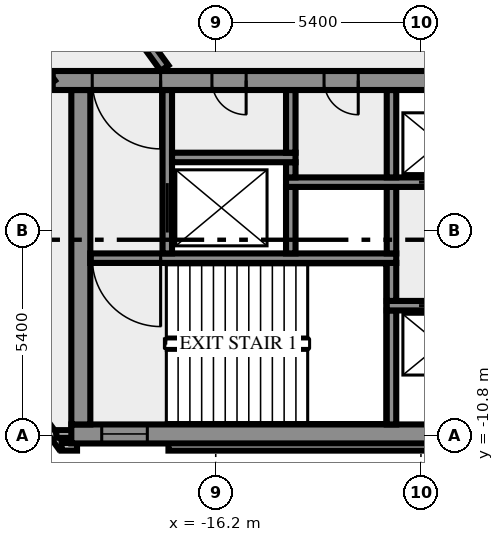
"""IFC4 building model, lengths in metres.
Left out: names, types, materials, properties, quantities, classifications, styles, units other than length and angle.
Written with IfcOpenShell. Run it as: python <this file> out.ifc"""

import sys

from ifc_helpers import new_model, si_unit, direction, frame, frame_2d, origin, place, context, subcontext, project, spatial, rectangle, extrude, element, fill, save


model = new_model("IFC4")
c1 = context("Model", 3, precision=1e-05, world=origin(), true_north=direction((0.0, 1.0)))
c2 = subcontext(c1, "Body", "Model", "MODEL_VIEW")
j1 = project(units=[si_unit("LENGTHUNIT", "METRE"), si_unit("PLANEANGLEUNIT", "RADIAN")], contexts=[c1])
p1 = place(None, origin())
s1 = spatial("IfcSite", under=j1, at=p1, CompositionType="ELEMENT")
p2 = place(p1, origin())
s2 = spatial("IfcBuilding", under=s1, at=p2, CompositionType="ELEMENT")
p3 = place(p2, frame((0.0, 0.0, 93.0)))
s3 = spatial("IfcBuildingStorey", under=s2, at=p3, CompositionType="ELEMENT", Elevation=93.0)
p4 = place(p3, frame((-21.833, -8.909, 0.0), z_axis=(0.0, 0.0, 1.0), x_axis=(0.587766567315, -0.809030569476, 0.0)))
e1 = element("IfcWall", 1, at=p4, inside=s3, PredefinedType="SOLIDWALL", context=c2, shape_type="SweptSolid", body=[
    extrude(rectangle(XDim=2.688, YDim=0.2, at=frame_2d((1.344, 0.0))), origin(), (0.0, 0.0, 1.0), 3.65),
])
p5 = place(p3, frame((-20.256, -11.088, 0.0), z_axis=(0.0, 0.0, 1.0), x_axis=(1.0, 0.0, 0.0)))
e2 = element("IfcWall", 2, at=p5, inside=s3, PredefinedType="SOLIDWALL", context=c2, shape_type="SweptSolid", body=[
    extrude(rectangle(XDim=0.406, YDim=0.2, at=frame_2d((0.203, 0.0))), origin(), (0.0, 0.0, 1.0), 3.65),
])
p6 = place(p3, frame((-17.444, -11.088, 0.0), z_axis=(0.0, 0.0, 1.0), x_axis=(1.0, 0.0, 0.0)))
e3 = element("IfcWall", 3, at=p6, inside=s3, PredefinedType="SOLIDWALL", context=c2, shape_type="SweptSolid", body=[
    extrude(rectangle(XDim=34.888, YDim=0.2, at=frame_2d((17.444, 0.0))), origin(), (0.0, 0.0, 1.0), 3.65),
])
p7 = place(p3, frame((-19.98, -10.75, 0.0), z_axis=(0.0, 0.0, 1.0), x_axis=(-1.0, 0.0, 0.0)))
e4 = element("IfcWall", 4, at=p7, inside=s3, PredefinedType="SOLIDWALL", context=c2, shape_type="SweptSolid", body=[
    extrude(rectangle(XDim=0.417, YDim=0.2, at=frame_2d((0.208, 0.0))), origin(), (0.0, 0.0, 1.0), 3.65),
])
p8 = place(p3, frame((-20.0, -10.75, 0.0), z_axis=(0.0, 0.0, 1.0), x_axis=(1.0, 0.0, 0.0)))
e5 = element("IfcWall", 5, at=p8, inside=s3, PredefinedType="SHEAR", context=c2, shape_type="SweptSolid", body=[
    extrude(rectangle(XDim=40.0, YDim=0.5, at=frame_2d((20.0, 0.0))), origin(), (0.0, 0.0, 1.0), 3.65),
])
p9 = place(p8, frame((0.8, 0.0, 1.0)))
e6 = element("IfcOpeningElement", 6, at=p9, cuts=e5, PredefinedType="OPENING", context=c2, shape_type="SweptSolid", body=[
    extrude(rectangle(XDim=1.2, YDim=1.2, at=frame_2d((0.6, 0.6))), frame((0.0, 0.26, 0.0), z_axis=(0.0, -1.0, 0.0), x_axis=(1.0, 0.0, 0.0)), (0.0, 0.0, 1.0), 0.52),
])
p10 = place(p8, frame((38.0, 0.0, 1.0)))
e7 = element("IfcOpeningElement", 7, at=p10, cuts=e5, PredefinedType="OPENING", context=c2, shape_type="SweptSolid", body=[
    extrude(rectangle(XDim=1.2, YDim=1.2, at=frame_2d((0.6, 0.6))), frame((0.0, 0.26, 0.0), z_axis=(0.0, -1.0, 0.0), x_axis=(1.0, 0.0, 0.0)), (0.0, 0.0, 1.0), 0.52),
])
p11 = place(p3, frame((-19.75, -10.5, 0.0), z_axis=(0.0, 0.0, 1.0), x_axis=(0.0, 1.0, 0.0)))
e8 = element("IfcWall", 8, at=p11, inside=s3, PredefinedType="SHEAR", context=c2, shape_type="SweptSolid", body=[
    extrude(rectangle(XDim=8.8, YDim=0.5, at=frame_2d((4.4, 0.0))), origin(), (0.0, 0.0, 1.0), 3.65),
])
p12 = place(p3, frame((-11.575, -10.5, 0.0), z_axis=(0.0, 0.0, 1.0), x_axis=(0.0, 1.0, 0.0)))
e9 = element("IfcWall", 9, at=p12, inside=s3, PredefinedType="SHEAR", context=c2, shape_type="SweptSolid", body=[
    extrude(rectangle(XDim=3.0, YDim=0.25, at=frame_2d((1.5, 0.0))), origin(), (0.0, 0.0, 1.0), 3.65),
])
p13 = place(p3, frame((11.7, -7.375, 0.0), z_axis=(0.0, 0.0, 1.0), x_axis=(-1.0, 0.0, 0.0)))
e10 = element("IfcWall", 10, at=p13, inside=s3, PredefinedType="SHEAR", context=c2, shape_type="SweptSolid", body=[
    extrude(rectangle(XDim=23.4, YDim=0.25, at=frame_2d((11.7, 0.0))), origin(), (0.0, 0.0, 1.0), 3.65),
])
p14 = place(p13, frame((21.45, 0.0, 0.0)))
e11 = element("IfcOpeningElement", 11, at=p14, cuts=e10, PredefinedType="OPENING", context=c2, shape_type="SweptSolid", body=[
    extrude(rectangle(XDim=1.1, YDim=2.1, at=frame_2d((0.55, 1.05))), frame((0.0, 0.135, 0.0), z_axis=(0.0, -1.0, 0.0), x_axis=(1.0, 0.0, 0.0)), (0.0, 0.0, 1.0), 0.27),
])
p15 = place(p13, frame((18.95, 0.0, 0.0)))
e12 = element("IfcOpeningElement", 12, at=p15, cuts=e10, PredefinedType="OPENING", context=c2, shape_type="SweptSolid", body=[
    extrude(rectangle(XDim=1.1, YDim=2.1, at=frame_2d((0.55, 1.05))), frame((0.0, 0.135, 0.0), z_axis=(0.0, -1.0, 0.0), x_axis=(1.0, 0.0, 0.0)), (0.0, 0.0, 1.0), 0.27),
])
p16 = place(p13, frame((16.45, 0.0, 0.0)))
e13 = element("IfcOpeningElement", 13, at=p16, cuts=e10, PredefinedType="OPENING", context=c2, shape_type="SweptSolid", body=[
    extrude(rectangle(XDim=1.1, YDim=2.1, at=frame_2d((0.55, 1.05))), frame((0.0, 0.135, 0.0), z_axis=(0.0, -1.0, 0.0), x_axis=(1.0, 0.0, 0.0)), (0.0, 0.0, 1.0), 0.27),
])
p17 = place(p13, frame((14.25, 0.0, 0.0)))
e14 = element("IfcOpeningElement", 14, at=p17, cuts=e10, PredefinedType="OPENING", context=c2, shape_type="SweptSolid", body=[
    extrude(rectangle(XDim=0.9, YDim=2.1, at=frame_2d((0.45, 1.05))), frame((0.0, 0.135, 0.0), z_axis=(0.0, -1.0, 0.0), x_axis=(1.0, 0.0, 0.0)), (0.0, 0.0, 1.0), 0.27),
])
p18 = place(p13, frame((12.125, 0.0, 0.0)))
e15 = element("IfcOpeningElement", 15, at=p18, cuts=e10, PredefinedType="OPENING", context=c2, shape_type="SweptSolid", body=[
    extrude(rectangle(XDim=0.9, YDim=2.1, at=frame_2d((0.45, 1.05))), frame((0.0, 0.135, 0.0), z_axis=(0.0, -1.0, 0.0), x_axis=(1.0, 0.0, 0.0)), (0.0, 0.0, 1.0), 0.27),
])
p19 = place(p13, frame((10.45, 0.0, 0.0)))
e16 = element("IfcOpeningElement", 16, at=p19, cuts=e10, PredefinedType="OPENING", context=c2, shape_type="SweptSolid", body=[
    extrude(rectangle(XDim=0.75, YDim=2.1, at=frame_2d((0.375, 1.05))), frame((0.0, 0.135, 0.0), z_axis=(0.0, -1.0, 0.0), x_axis=(1.0, 0.0, 0.0)), (0.0, 0.0, 1.0), 0.27),
])
p20 = place(p3, frame((-11.575, -7.25, 0.0), z_axis=(0.0, 0.0, 1.0), x_axis=(0.0, 1.0, 0.0)))
e17 = element("IfcWall", 17, at=p20, inside=s3, PredefinedType="SHEAR", context=c2, shape_type="SweptSolid", body=[
    extrude(rectangle(XDim=1.0, YDim=0.25, at=frame_2d((0.5, 0.0))), origin(), (0.0, 0.0, 1.0), 3.65),
])
p21 = place(p3, frame((-11.45, -6.125, 0.0), z_axis=(0.0, 0.0, 1.0), x_axis=(-1.0, 0.0, 0.0)))
e18 = element("IfcWall", 18, at=p21, inside=s3, PredefinedType="SHEAR", context=c2, shape_type="SweptSolid", body=[
    extrude(rectangle(XDim=8.05, YDim=0.25, at=frame_2d((4.025, 0.0))), origin(), (0.0, 0.0, 1.0), 3.65),
])
p22 = place(p21, frame((6.2, 0.0, 0.0)))
e19 = element("IfcOpeningElement", 19, at=p22, cuts=e18, PredefinedType="OPENING", context=c2, shape_type="SweptSolid", body=[
    extrude(rectangle(XDim=1.8, YDim=2.1, at=frame_2d((0.9, 1.05))), frame((0.0, 0.135, 0.0), z_axis=(0.0, -1.0, 0.0), x_axis=(1.0, 0.0, 0.0)), (0.0, 0.0, 1.0), 0.27),
])
p23 = place(p3, frame((-17.475, -6.0, 0.0), z_axis=(0.0, 0.0, 1.0), x_axis=(0.0, 1.0, 0.0)))
e20 = element("IfcWall", 20, at=p23, inside=s3, PredefinedType="SHEAR", context=c2, shape_type="SweptSolid", body=[
    extrude(rectangle(XDim=4.3, YDim=0.25, at=frame_2d((2.15, 0.0))), origin(), (0.0, 0.0, 1.0), 3.65),
])
p24 = place(p23, frame((0.55, 0.0, 0.0)))
e21 = element("IfcOpeningElement", 21, at=p24, cuts=e20, PredefinedType="OPENING", context=c2, shape_type="SweptSolid", body=[
    extrude(rectangle(XDim=1.3, YDim=2.1, at=frame_2d((0.65, 1.05))), frame((0.0, 0.135, 0.0), z_axis=(0.0, -1.0, 0.0), x_axis=(1.0, 0.0, 0.0)), (0.0, 0.0, 1.0), 0.27),
])
for number, where, z_axis, x_axis in (
    (22, (-14.225, -6.0, 0.0), (0.0, 0.0, 1.0), (0.0, 1.0, 0.0)),
    (23, (-11.575, -6.0, 0.0), (0.0, 0.0, 1.0), (0.0, 1.0, 0.0)),
):
    element("IfcWall", number, at=place(p3, frame(where, z_axis=z_axis, x_axis=x_axis)), inside=s3, PredefinedType="SHEAR", context=c2, shape_type="SweptSolid", body=[
        extrude(rectangle(XDim=1.75, YDim=0.25, at=frame_2d((0.875, 0.0))), origin(), (0.0, 0.0, 1.0), 3.65),
    ])
p25 = place(p3, frame((-14.35, -4.125, 0.0), z_axis=(0.0, 0.0, 1.0), x_axis=(1.0, 0.0, 0.0)))
e24 = element("IfcWall", 24, at=p25, inside=s3, PredefinedType="SHEAR", context=c2, shape_type="SweptSolid", body=[
    extrude(rectangle(XDim=10.4, YDim=0.25, at=frame_2d((5.2, 0.0))), origin(), (0.0, 0.0, 1.0), 3.65),
])
p26 = place(p25, frame((3.5, 0.0, 0.0)))
e25 = element("IfcOpeningElement", 25, at=p26, cuts=e24, PredefinedType="OPENING", context=c2, shape_type="SweptSolid", body=[
    extrude(rectangle(XDim=1.1, YDim=2.1, at=frame_2d((0.55, 1.05))), frame((0.0, 0.135, 0.0), z_axis=(0.0, -1.0, 0.0), x_axis=(1.0, 0.0, 0.0)), (0.0, 0.0, 1.0), 0.27),
])
p27 = place(p25, frame((6.0, 0.0, 0.0)))
e26 = element("IfcOpeningElement", 26, at=p27, cuts=e24, PredefinedType="OPENING", context=c2, shape_type="SweptSolid", body=[
    extrude(rectangle(XDim=1.1, YDim=2.1, at=frame_2d((0.55, 1.05))), frame((0.0, 0.135, 0.0), z_axis=(0.0, -1.0, 0.0), x_axis=(1.0, 0.0, 0.0)), (0.0, 0.0, 1.0), 0.27),
])
p28 = place(p25, frame((8.5, 0.0, 0.0)))
e27 = element("IfcOpeningElement", 27, at=p28, cuts=e24, PredefinedType="OPENING", context=c2, shape_type="SweptSolid", body=[
    extrude(rectangle(XDim=1.1, YDim=2.1, at=frame_2d((0.55, 1.05))), frame((0.0, 0.135, 0.0), z_axis=(0.0, -1.0, 0.0), x_axis=(1.0, 0.0, 0.0)), (0.0, 0.0, 1.0), 0.27),
])
p29 = place(p3, frame((-14.225, -4.0, 0.0), z_axis=(0.0, 0.0, 1.0), x_axis=(0.0, 1.0, 0.0)))
e28 = element("IfcWall", 28, at=p29, inside=s3, PredefinedType="SHEAR", context=c2, shape_type="SweptSolid", body=[
    extrude(rectangle(XDim=0.4, YDim=0.25, at=frame_2d((0.2, 0.0))), origin(), (0.0, 0.0, 1.0), 3.65),
])
p30 = place(p3, frame((-11.575, -4.0, 0.0), z_axis=(0.0, 0.0, 1.0), x_axis=(0.0, 1.0, 0.0)))
e29 = element("IfcWall", 29, at=p30, inside=s3, PredefinedType="SHEAR", context=c2, shape_type="SweptSolid", body=[
    extrude(rectangle(XDim=2.3, YDim=0.25, at=frame_2d((1.15, 0.0))), origin(), (0.0, 0.0, 1.0), 3.65),
])
p31 = place(p3, frame((-17.35, -3.475, 0.0), z_axis=(0.0, 0.0, 1.0), x_axis=(1.0, 0.0, 0.0)))
e30 = element("IfcWall", 30, at=p31, inside=s3, PredefinedType="SHEAR", context=c2, shape_type="SweptSolid", body=[
    extrude(rectangle(XDim=3.25, YDim=0.25, at=frame_2d((1.625, 0.0))), origin(), (0.0, 0.0, 1.0), 3.65),
])
p32 = place(p3, frame((-14.225, -3.35, 0.0), z_axis=(0.0, 0.0, 1.0), x_axis=(0.0, 1.0, 0.0)))
e31 = element("IfcWall", 31, at=p32, inside=s3, PredefinedType="SHEAR", context=c2, shape_type="SweptSolid", body=[
    extrude(rectangle(XDim=1.65, YDim=0.25, at=frame_2d((0.825, 0.0))), origin(), (0.0, 0.0, 1.0), 3.65),
])
p33 = place(p3, frame((20.49, -1.45, 0.0), z_axis=(0.0, 0.0, 1.0), x_axis=(-1.0, 0.0, 0.0)))
e32 = element("IfcWall", 32, at=p33, inside=s3, PredefinedType="SHEAR", context=c2, shape_type="SweptSolid", body=[
    extrude(rectangle(XDim=40.98, YDim=0.5, at=frame_2d((20.49, 0.0))), origin(), (0.0, 0.0, 1.0), 3.65),
])
p34 = place(p33, frame((38.14, 0.0, 0.0)))
e33 = element("IfcOpeningElement", 33, at=p34, cuts=e32, PredefinedType="OPENING", context=c2, shape_type="SweptSolid", body=[
    extrude(rectangle(XDim=1.8, YDim=2.1, at=frame_2d((0.9, 1.05))), frame((0.0, 0.26, 0.0), z_axis=(0.0, -1.0, 0.0), x_axis=(1.0, 0.0, 0.0)), (0.0, 0.0, 1.0), 0.52),
])
p35 = place(p33, frame((35.89, 0.0, 0.0)))
e34 = element("IfcOpeningElement", 34, at=p35, cuts=e32, PredefinedType="OPENING", context=c2, shape_type="SweptSolid", body=[
    extrude(rectangle(XDim=0.9, YDim=2.1, at=frame_2d((0.45, 1.05))), frame((0.0, 0.26, 0.0), z_axis=(0.0, -1.0, 0.0), x_axis=(1.0, 0.0, 0.0)), (0.0, 0.0, 1.0), 0.52),
])
p36 = place(p33, frame((32.94, 0.0, 0.0)))
e35 = element("IfcOpeningElement", 35, at=p36, cuts=e32, PredefinedType="OPENING", context=c2, shape_type="SweptSolid", body=[
    extrude(rectangle(XDim=0.9, YDim=2.1, at=frame_2d((0.45, 1.05))), frame((0.0, 0.26, 0.0), z_axis=(0.0, -1.0, 0.0), x_axis=(1.0, 0.0, 0.0)), (0.0, 0.0, 1.0), 0.52),
])
p37 = place(p33, frame((21.765, 0.0, 0.0)))
e36 = element("IfcOpeningElement", 36, at=p37, cuts=e32, PredefinedType="OPENING", context=c2, shape_type="SweptSolid", body=[
    extrude(rectangle(XDim=2.0, YDim=2.1, at=frame_2d((1.0, 1.05))), frame((0.0, 0.26, 0.0), z_axis=(0.0, -1.0, 0.0), x_axis=(1.0, 0.0, 0.0)), (0.0, 0.0, 1.0), 0.52),
])
p38 = place(p33, frame((7.14, 0.0, 0.0)))
e37 = element("IfcOpeningElement", 37, at=p38, cuts=e32, PredefinedType="OPENING", context=c2, shape_type="SweptSolid", body=[
    extrude(rectangle(XDim=0.9, YDim=2.1, at=frame_2d((0.45, 1.05))), frame((0.0, 0.26, 0.0), z_axis=(0.0, -1.0, 0.0), x_axis=(1.0, 0.0, 0.0)), (0.0, 0.0, 1.0), 0.52),
])
p39 = place(p33, frame((5.028, 0.0, 0.0)))
e38 = element("IfcOpeningElement", 38, at=p39, cuts=e32, PredefinedType="OPENING", context=c2, shape_type="SweptSolid", body=[
    extrude(rectangle(XDim=0.8, YDim=2.1, at=frame_2d((0.4, 1.05))), frame((0.0, 0.26, 0.0), z_axis=(0.0, -1.0, 0.0), x_axis=(1.0, 0.0, 0.0)), (0.0, 0.0, 1.0), 0.52),
])
p40 = place(p33, frame((3.452, 0.0, 0.0)))
e39 = element("IfcOpeningElement", 39, at=p40, cuts=e32, PredefinedType="OPENING", context=c2, shape_type="SweptSolid", body=[
    extrude(rectangle(XDim=0.8, YDim=2.1, at=frame_2d((0.4, 1.05))), frame((0.0, 0.26, 0.0), z_axis=(0.0, -1.0, 0.0), x_axis=(1.0, 0.0, 0.0)), (0.0, 0.0, 1.0), 0.52),
])
p41 = place(p33, frame((1.04, 0.0, 0.0)))
e40 = element("IfcOpeningElement", 40, at=p41, cuts=e32, PredefinedType="OPENING", context=c2, shape_type="SweptSolid", body=[
    extrude(rectangle(XDim=1.8, YDim=2.1, at=frame_2d((0.9, 1.05))), frame((0.0, 0.26, 0.0), z_axis=(0.0, -1.0, 0.0), x_axis=(1.0, 0.0, 0.0)), (0.0, 0.0, 1.0), 0.52),
])
p42 = place(p3, frame((-20.531, -1.523, 0.0), z_axis=(0.0, 0.0, 1.0), x_axis=(-0.587784522481, 0.809017524614, 0.0)))
e41 = element("IfcWall", 41, at=p42, inside=s3, PredefinedType="SOLIDWALL", context=c2, shape_type="SweptSolid", body=[
    extrude(rectangle(XDim=49.912, YDim=0.25, at=frame_2d((24.956, 0.0))), origin(), (0.0, 0.0, 1.0), 3.65),
])
p43 = place(p42, frame((0.533, 0.0, 0.0)))
e42 = element("IfcOpeningElement", 42, at=p43, cuts=e41, PredefinedType="OPENING", context=c2, shape_type="SweptSolid", body=[
    extrude(rectangle(XDim=0.9, YDim=2.1, at=frame_2d((0.45, 1.05))), frame((0.0, 0.135, 0.0), z_axis=(0.0, -1.0, 0.0), x_axis=(1.0, 0.0, 0.0)), (0.0, 0.0, 1.0), 0.27),
])
p44 = place(p42, frame((48.47, 0.0, 0.0)))
e43 = element("IfcOpeningElement", 43, at=p44, cuts=e41, PredefinedType="OPENING", context=c2, shape_type="SweptSolid", body=[
    extrude(rectangle(XDim=1.0, YDim=2.1, at=frame_2d((0.5, 1.05))), frame((0.0, 0.135, 0.0), z_axis=(0.0, -1.0, 0.0), x_axis=(1.0, 0.0, 0.0)), (0.0, 0.0, 1.0), 0.27),
])
p45 = place(p42, frame((17.365, 0.0, 0.0)))
e44 = element("IfcOpeningElement", 44, at=p45, cuts=e41, PredefinedType="OPENING", context=c2, shape_type="SweptSolid", body=[
    extrude(rectangle(XDim=1.8, YDim=2.1, at=frame_2d((0.9, 1.05))), frame((0.0, 0.135, 0.0), z_axis=(0.0, -1.0, 0.0), x_axis=(1.0, 0.0, 0.0)), (0.0, 0.0, 1.0), 0.27),
])
p46 = place(p42, frame((7.816, 0.0, 0.0)))
e45 = element("IfcOpeningElement", 45, at=p46, cuts=e41, PredefinedType="OPENING", context=c2, shape_type="SweptSolid", body=[
    extrude(rectangle(XDim=0.9, YDim=2.1, at=frame_2d((0.45, 1.05))), frame((0.0, 0.135, 0.0), z_axis=(0.0, -1.0, 0.0), x_axis=(1.0, 0.0, 0.0)), (0.0, 0.0, 1.0), 0.27),
])
p47 = place(p3, frame((-37.232, 25.972, 0.0), z_axis=(0.0, 0.0, 1.0), x_axis=(0.587786323093, -0.809016216391, 0.0)))
e46 = element("IfcWall", 46, at=p47, inside=s3, PredefinedType="SOLIDWALL", context=c2, shape_type="SweptSolid", body=[
    extrude(rectangle(XDim=33.493, YDim=0.25, at=frame_2d((16.747, 0.0))), origin(), (0.0, 0.0, 1.0), 3.65),
])
p48 = place(p47, frame((19.135, 0.0, 0.0)))
e47 = element("IfcOpeningElement", 47, at=p48, cuts=e46, PredefinedType="OPENING", context=c2, shape_type="SweptSolid", body=[
    extrude(rectangle(XDim=0.9, YDim=2.1, at=frame_2d((0.45, 1.05))), frame((0.0, 0.135, 0.0), z_axis=(0.0, -1.0, 0.0), x_axis=(1.0, 0.0, 0.0)), (0.0, 0.0, 1.0), 0.27),
])
p49 = place(p47, frame((7.137, 0.0, 0.0)))
e48 = element("IfcOpeningElement", 48, at=p49, cuts=e46, PredefinedType="OPENING", context=c2, shape_type="SweptSolid", body=[
    extrude(rectangle(XDim=1.8, YDim=2.1, at=frame_2d((0.9, 1.05))), frame((0.0, 0.135, 0.0), z_axis=(0.0, -1.0, 0.0), x_axis=(1.0, 0.0, 0.0)), (0.0, 0.0, 1.0), 0.27),
])
p50 = place(p47, frame((16.435, 0.0, 0.0)))
e49 = element("IfcOpeningElement", 49, at=p50, cuts=e46, PredefinedType="OPENING", context=c2, shape_type="SweptSolid", body=[
    extrude(rectangle(XDim=0.9, YDim=2.1, at=frame_2d((0.45, 1.05))), frame((0.0, 0.135, 0.0), z_axis=(0.0, -1.0, 0.0), x_axis=(1.0, 0.0, 0.0)), (0.0, 0.0, 1.0), 0.27),
])
p51 = place(p9, origin())
e50 = element("IfcWindow", 50, at=p51, inside=s3, PartitioningType="SINGLE_PANEL", PredefinedType="WINDOW", context=c2, shape_type="SweptSolid", body=[
    extrude(rectangle(XDim=1.2, YDim=1.2, at=frame_2d((0.6, 0.6))), frame((0.0, 0.03, 0.0), z_axis=(0.0, -1.0, 0.0), x_axis=(1.0, 0.0, 0.0)), (0.0, 0.0, 1.0), 0.06),
])
fill(e6, e50)
p52 = place(p14, origin())
e51 = element("IfcDoor", 51, at=p52, inside=s3, OperationType="DOUBLE_DOOR_SLIDING", PredefinedType="DOOR", context=c2, shape_type="SweptSolid", body=[
    extrude(rectangle(XDim=1.1, YDim=2.1, at=frame_2d((0.55, 1.05))), frame((0.0, 0.025, 0.0), z_axis=(0.0, -1.0, 0.0), x_axis=(1.0, 0.0, 0.0)), (0.0, 0.0, 1.0), 0.05),
])
fill(e11, e51)
p53 = place(p22, origin())
e52 = element("IfcDoor", 52, at=p53, inside=s3, OperationType="DOUBLE_DOOR_SINGLE_SWING", PredefinedType="DOOR", context=c2, shape_type="SweptSolid", body=[
    extrude(rectangle(XDim=1.8, YDim=2.1, at=frame_2d((0.9, 1.05))), frame((0.0, 0.025, 0.0), z_axis=(0.0, -1.0, 0.0), x_axis=(1.0, 0.0, 0.0)), (0.0, 0.0, 1.0), 0.05),
])
fill(e19, e52)
p54 = place(p24, origin())
e53 = element("IfcDoor", 53, at=p54, inside=s3, OperationType="DOUBLE_DOOR_SLIDING", PredefinedType="DOOR", context=c2, shape_type="SweptSolid", body=[
    extrude(rectangle(XDim=1.3, YDim=2.1, at=frame_2d((0.65, 1.05))), frame((0.0, 0.025, 0.0), z_axis=(0.0, -1.0, 0.0), x_axis=(1.0, 0.0, 0.0)), (0.0, 0.0, 1.0), 0.05),
])
fill(e21, e53)
p55 = place(p26, origin())
e54 = element("IfcDoor", 54, at=p55, inside=s3, OperationType="DOUBLE_DOOR_SLIDING", PredefinedType="DOOR", context=c2, shape_type="SweptSolid", body=[
    extrude(rectangle(XDim=1.1, YDim=2.1, at=frame_2d((0.55, 1.05))), frame((0.0, 0.025, 0.0), z_axis=(0.0, -1.0, 0.0), x_axis=(1.0, 0.0, 0.0)), (0.0, 0.0, 1.0), 0.05),
])
fill(e25, e54)
p56 = place(p34, origin())
e55 = element("IfcDoor", 55, at=p56, inside=s3, OperationType="DOUBLE_DOOR_SINGLE_SWING", PredefinedType="DOOR", context=c2, shape_type="SweptSolid", body=[
    extrude(rectangle(XDim=1.8, YDim=2.1, at=frame_2d((0.9, 1.05))), frame((0.0, 0.025, 0.0), z_axis=(0.0, -1.0, 0.0), x_axis=(1.0, 0.0, 0.0)), (0.0, 0.0, 1.0), 0.05),
])
fill(e33, e55)
p57 = place(p35, origin())
e56 = element("IfcDoor", 56, at=p57, inside=s3, OperationType="SINGLE_SWING_RIGHT", PredefinedType="DOOR", context=c2, shape_type="SweptSolid", body=[
    extrude(rectangle(XDim=0.9, YDim=2.1, at=frame_2d((0.45, 1.05))), frame((0.0, 0.025, 0.0), z_axis=(0.0, -1.0, 0.0), x_axis=(1.0, 0.0, 0.0)), (0.0, 0.0, 1.0), 0.05),
])
fill(e34, e56)
p58 = place(p36, origin())
e57 = element("IfcDoor", 57, at=p58, inside=s3, OperationType="SINGLE_SWING_RIGHT", PredefinedType="DOOR", context=c2, shape_type="SweptSolid", body=[
    extrude(rectangle(XDim=0.9, YDim=2.1, at=frame_2d((0.45, 1.05))), frame((0.0, 0.025, 0.0), z_axis=(0.0, -1.0, 0.0), x_axis=(1.0, 0.0, 0.0)), (0.0, 0.0, 1.0), 0.05),
])
fill(e35, e57)
save(model, sys.argv[1])
